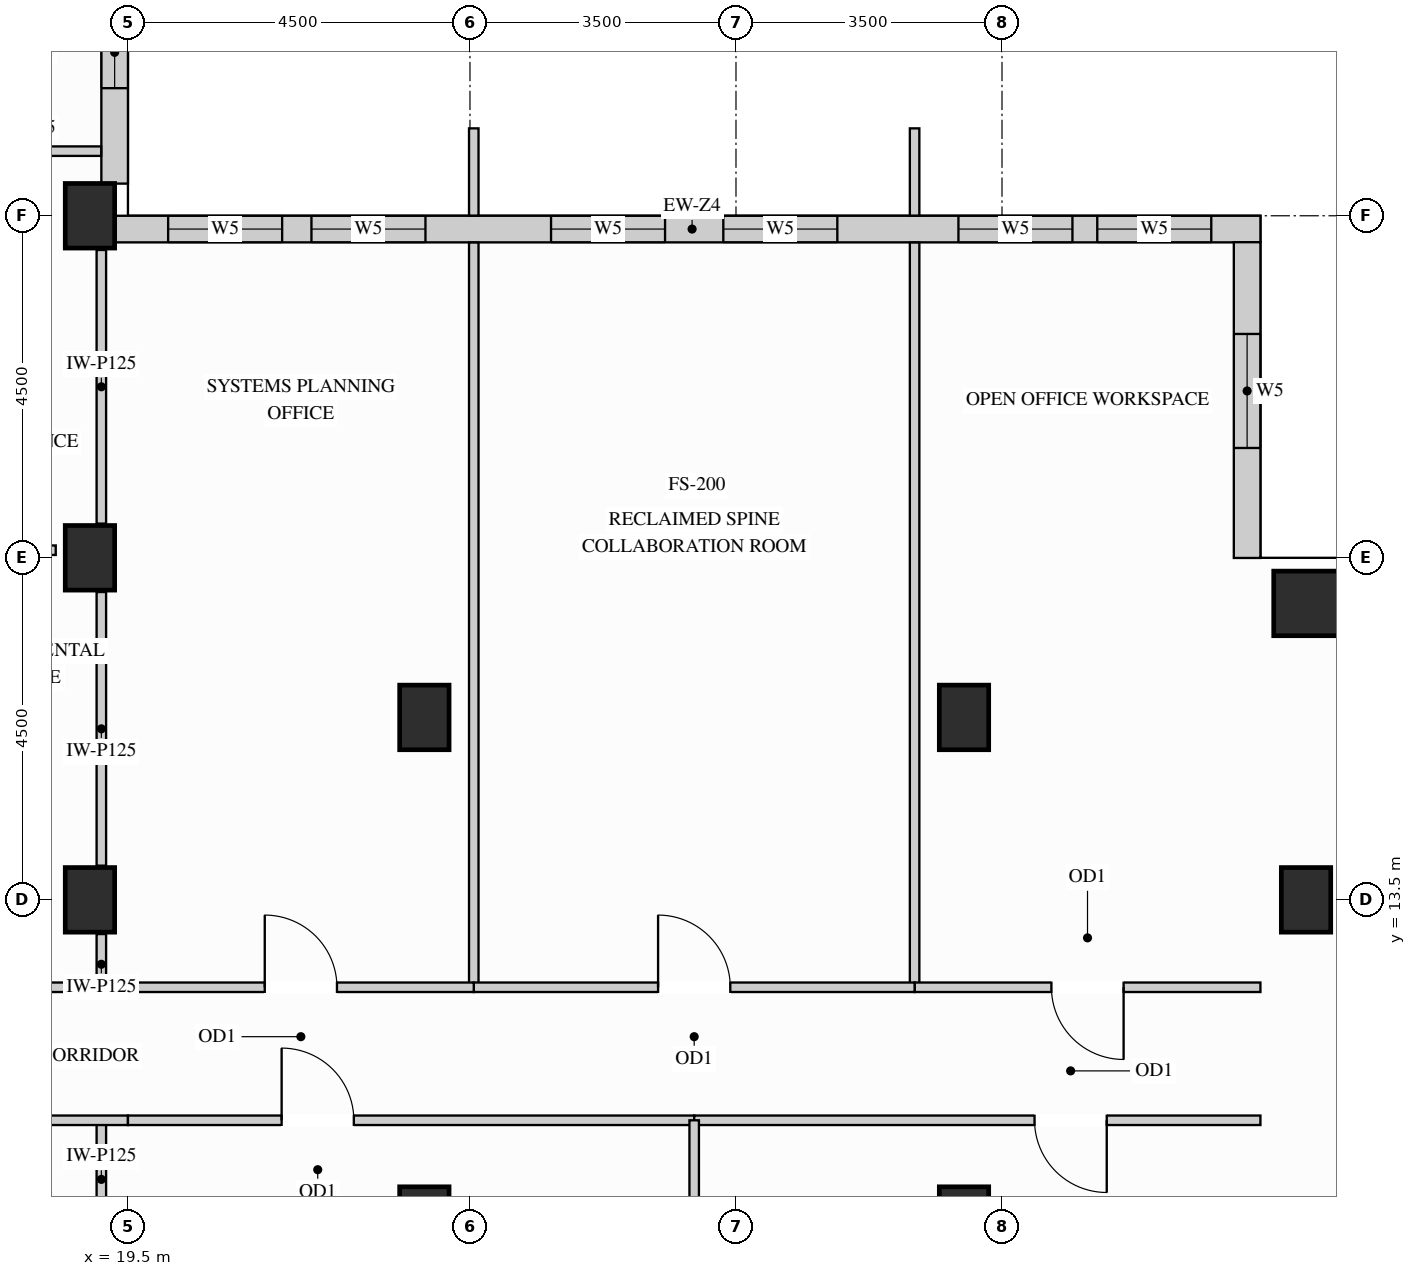
"""IFC4 building model, lengths in metres.
Left out: names, types, materials, properties, quantities, classifications, styles, units other than length and angle.
Written with IfcOpenShell. Run it as: python <this file> out.ifc"""

import sys

from ifc_helpers import new_model, si_unit, direction, frame, frame_2d, origin, origin_2d, place, context, subcontext, project, spatial, rectangle, extrude, source, transform, mapped, element, fill, save


model = new_model("IFC4")
c1 = context("Model", 3, precision=1e-05, world=origin(), true_north=direction((0.0, 1.0)))
c2 = subcontext(c1, "Body", "Model", "MODEL_VIEW")
j1 = project(units=[si_unit("LENGTHUNIT", "METRE"), si_unit("PLANEANGLEUNIT", "RADIAN")], contexts=[c1])
p1 = place(None, origin())
s1 = spatial("IfcSite", under=j1, at=p1, CompositionType="ELEMENT")
p2 = place(p1, origin())
s2 = spatial("IfcBuilding", under=s1, at=p2, CompositionType="ELEMENT")
p3 = place(p2, frame((0.0, 0.0, 259.2)))
s3 = spatial("IfcBuildingStorey", under=s2, at=p3, CompositionType="ELEMENT", Elevation=259.2)
m1 = source(origin(), c2, "Body", "SweptSolid", [
    extrude(rectangle(XDim=0.65, YDim=0.85, at=origin_2d()), origin(), (0.0, 0.0, 1.0), 3.4),
])
for number, where, z_axis, x_axis in (
    (1, (19.0, 13.5, 0.0), (0.0, 0.0, 1.0), (1.0, 0.0, 0.0)),
    (2, (19.0, 18.0, 0.0), (0.0, 0.0, 1.0), (1.0, 0.0, 0.0)),
    (3, (19.0, 22.5, 0.0), (0.0, 0.0, 1.0), (1.0, 0.0, 0.0)),
    (4, (35.0, 13.5, 0.0), (0.0, 0.0, 1.0), (1.0, 0.0, 0.0)),
    (5, (23.4, 15.9, 0.0), (0.0, 0.0, 1.0), (1.0, 0.0, 0.0)),
    (6, (23.4, 9.3, 0.0), (0.0, 0.0, 1.0), (1.0, 0.0, 0.0)),
    (7, (30.5, 15.9, 0.0), (0.0, 0.0, 1.0), (1.0, 0.0, 0.0)),
    (8, (30.5, 9.3, 0.0), (0.0, 0.0, 1.0), (1.0, 0.0, 0.0)),
):
    element("IfcColumn", number, at=place(p3, frame(where, z_axis=z_axis, x_axis=x_axis)), inside=s3, PredefinedType="COLUMN", context=c2, shape_type="MappedRepresentation", body=[
        mapped(m1, transform((0.0, 0.0, 0.0), x_axis=(1.0, 0.0, 0.0), y_axis=(0.0, 1.0, 0.0), z_axis=(0.0, 0.0, 1.0))),
    ])
m2 = source(origin(), c2, "Body", "SweptSolid", [
    extrude(rectangle(XDim=0.85, YDim=0.85, at=origin_2d()), origin(), (0.0, 0.0, 1.0), 3.4),
])
p4 = place(p3, frame((35.0, 17.4, 0.0), z_axis=(0.0, 0.0, 1.0), x_axis=(1.0, 0.0, 0.0)))
e9 = element("IfcColumn", 9, at=p4, inside=s3, PredefinedType="COLUMN", context=c2, shape_type="MappedRepresentation", body=[
    mapped(m2, transform((0.0, 0.0, 0.0), x_axis=(1.0, 0.0, 0.0), y_axis=(0.0, 1.0, 0.0), z_axis=(0.0, 0.0, 1.0))),
])
p5 = place(p3, frame((34.4, 22.325, 0.0), z_axis=(0.0, 0.0, 1.0), x_axis=(-1.0, 0.0, 0.0)))
e10 = element("IfcWall", 10, at=p5, inside=s3, PredefinedType="SOLIDWALL", context=c2, shape_type="SweptSolid", body=[
    extrude(rectangle(XDim=15.077, YDim=0.35, at=frame_2d((7.539, 0.0))), origin(), (0.0, 0.0, 1.0), 3.385),
])
p6 = place(p5, frame((0.647, 0.0, 0.78)))
e11 = element("IfcOpeningElement", 11, at=p6, cuts=e10, PredefinedType="OPENING", context=c2, shape_type="SweptSolid", body=[
    extrude(rectangle(XDim=1.5, YDim=2.0, at=frame_2d((0.75, 1.0))), frame((0.0, 0.185, 0.0), z_axis=(0.0, -1.0, 0.0), x_axis=(1.0, 0.0, 0.0)), (0.0, 0.0, 1.0), 0.37),
])
p7 = place(p5, frame((2.473, 0.0, 0.78)))
e12 = element("IfcOpeningElement", 12, at=p7, cuts=e10, PredefinedType="OPENING", context=c2, shape_type="SweptSolid", body=[
    extrude(rectangle(XDim=1.5, YDim=2.0, at=frame_2d((0.75, 1.0))), frame((0.0, 0.185, 0.0), z_axis=(0.0, -1.0, 0.0), x_axis=(1.0, 0.0, 0.0)), (0.0, 0.0, 1.0), 0.37),
])
p8 = place(p5, frame((5.567, 0.0, 0.78)))
e13 = element("IfcOpeningElement", 13, at=p8, cuts=e10, PredefinedType="OPENING", context=c2, shape_type="SweptSolid", body=[
    extrude(rectangle(XDim=1.5, YDim=2.0, at=frame_2d((0.75, 1.0))), frame((0.0, 0.185, 0.0), z_axis=(0.0, -1.0, 0.0), x_axis=(1.0, 0.0, 0.0)), (0.0, 0.0, 1.0), 0.37),
])
p9 = place(p5, frame((7.833, 0.0, 0.78)))
e14 = element("IfcOpeningElement", 14, at=p9, cuts=e10, PredefinedType="OPENING", context=c2, shape_type="SweptSolid", body=[
    extrude(rectangle(XDim=1.5, YDim=2.0, at=frame_2d((0.75, 1.0))), frame((0.0, 0.185, 0.0), z_axis=(0.0, -1.0, 0.0), x_axis=(1.0, 0.0, 0.0)), (0.0, 0.0, 1.0), 0.37),
])
p10 = place(p5, frame((10.986, 0.0, 0.78)))
e15 = element("IfcOpeningElement", 15, at=p10, cuts=e10, PredefinedType="OPENING", context=c2, shape_type="SweptSolid", body=[
    extrude(rectangle(XDim=1.5, YDim=2.0, at=frame_2d((0.75, 1.0))), frame((0.0, 0.185, 0.0), z_axis=(0.0, -1.0, 0.0), x_axis=(1.0, 0.0, 0.0)), (0.0, 0.0, 1.0), 0.37),
])
p11 = place(p5, frame((12.871, 0.0, 0.78)))
e16 = element("IfcOpeningElement", 16, at=p11, cuts=e10, PredefinedType="OPENING", context=c2, shape_type="SweptSolid", body=[
    extrude(rectangle(XDim=1.5, YDim=2.0, at=frame_2d((0.75, 1.0))), frame((0.0, 0.185, 0.0), z_axis=(0.0, -1.0, 0.0), x_axis=(1.0, 0.0, 0.0)), (0.0, 0.0, 1.0), 0.37),
])
p12 = place(p3, frame((19.325, 22.923, 0.0), z_axis=(0.0, 0.0, 1.0), x_axis=(0.0, 1.0, 0.0)))
e17 = element("IfcWall", 17, at=p12, inside=s3, PredefinedType="SOLIDWALL", context=c2, shape_type="SweptSolid", body=[
    extrude(rectangle(XDim=3.454, YDim=0.35, at=frame_2d((1.727, 0.0))), origin(), (0.0, 0.0, 1.0), 2.619),
])
p13 = place(p12, frame((1.256, 0.0, 0.78)))
e18 = element("IfcOpeningElement", 18, at=p13, cuts=e17, PredefinedType="OPENING", context=c2, shape_type="SweptSolid", body=[
    extrude(rectangle(XDim=1.5, YDim=1.659, at=frame_2d((0.75, 0.83))), frame((0.0, 0.185, 0.0), z_axis=(0.0, -1.0, 0.0), x_axis=(1.0, 0.0, 0.0)), (0.0, 0.0, 1.0), 0.37),
])
p14 = place(p3, frame((34.225, 17.998, 0.0), z_axis=(0.0, 0.0, 1.0), x_axis=(0.0, 1.0, 0.0)))
e19 = element("IfcWall", 19, at=p14, inside=s3, PredefinedType="SOLIDWALL", context=c2, shape_type="SweptSolid", body=[
    extrude(rectangle(XDim=4.154, YDim=0.35, at=frame_2d((2.077, 0.0))), origin(), (0.0, 0.0, 1.0), 3.385),
])
p15 = place(p14, frame((1.447, 0.0, 0.78)))
e20 = element("IfcOpeningElement", 20, at=p15, cuts=e19, PredefinedType="OPENING", context=c2, shape_type="SweptSolid", body=[
    extrude(rectangle(XDim=1.5, YDim=2.0, at=frame_2d((0.75, 1.0))), frame((0.0, 0.185, 0.0), z_axis=(0.0, -1.0, 0.0), x_axis=(1.0, 0.0, 0.0)), (0.0, 0.0, 1.0), 0.37),
])
m3 = source(origin(), c2, "Body", "SweptSolid", [
    extrude(rectangle(XDim=1.5, YDim=0.125, at=frame_2d((0.75, 0.0))), origin(), (0.0, 0.0, 1.0), 2.773),
])
p16 = place(p3, frame((17.05, 18.1, 0.0), z_axis=(0.0, 0.0, 1.0), x_axis=(1.0, 0.0, 0.0)))
e21 = element("IfcWall", 21, at=p16, inside=s3, PredefinedType="PARTITIONING", context=c2, shape_type="MappedRepresentation", body=[
    mapped(m3, transform((0.0, 0.0, 0.0), x_axis=(1.0, 0.0, 0.0), y_axis=(0.0, 1.0, 0.0), z_axis=(0.0, 0.0, 1.0))),
])
m4 = source(origin(), c2, "Body", "SweptSolid", [
    extrude(rectangle(XDim=2.098, YDim=0.125, at=frame_2d((1.049, 0.0))), origin(), (0.0, 0.0, 1.0), 3.385),
])
p17 = place(p3, frame((17.05, 23.35, 0.0), z_axis=(0.0, 0.0, 1.0), x_axis=(1.0, 0.0, 0.0)))
e22 = element("IfcWall", 22, at=p17, inside=s3, PredefinedType="PARTITIONING", context=c2, shape_type="MappedRepresentation", body=[
    mapped(m4, transform((0.0, 0.0, 0.0), x_axis=(1.0, 0.0, 0.0), y_axis=(0.0, 1.0, 0.0), z_axis=(0.0, 0.0, 1.0))),
])
m5 = source(origin(), c2, "Body", "SweptSolid", [
    extrude(rectangle(XDim=0.7, YDim=0.125, at=frame_2d((0.35, 0.0))), origin(), (0.0, 0.0, 1.0), 2.773),
])
p18 = place(p3, frame((19.15, 12.35, 0.0), z_axis=(0.0, 0.0, 1.0), x_axis=(0.0, 1.0, 0.0)))
e23 = element("IfcWall", 23, at=p18, inside=s3, PredefinedType="PARTITIONING", context=c2, shape_type="MappedRepresentation", body=[
    mapped(m5, transform((0.0, 0.0, 0.0), x_axis=(1.0, 0.0, 0.0), y_axis=(0.0, 1.0, 0.0), z_axis=(0.0, 0.0, 1.0))),
])
m6 = source(origin(), c2, "Body", "SweptSolid", [
    extrude(rectangle(XDim=3.6, YDim=0.125, at=frame_2d((1.8, 0.0))), origin(), (0.0, 0.0, 1.0), 2.773),
])
for number, where, z_axis, x_axis in (
    (24, (19.15, 13.95, 0.0), (0.0, 0.0, 1.0), (0.0, 1.0, 0.0)),
    (25, (19.15, 18.45, 0.0), (0.0, 0.0, 1.0), (0.0, 1.0, 0.0)),
):
    element("IfcWall", number, at=place(p3, frame(where, z_axis=z_axis, x_axis=x_axis)), inside=s3, PredefinedType="PARTITIONING", context=c2, shape_type="MappedRepresentation", body=[
        mapped(m6, transform((0.0, 0.0, 0.0), x_axis=(1.0, 0.0, 0.0), y_axis=(0.0, 1.0, 0.0), z_axis=(0.0, 0.0, 1.0))),
    ])
m7 = source(origin(), c2, "Body", "SweptSolid", [
    extrude(rectangle(XDim=1.65, YDim=0.125, at=frame_2d((0.825, 0.0))), origin(), (0.0, 0.0, 1.0), 2.773),
])
p19 = place(p3, frame((19.15, 8.95, 0.0), z_axis=(0.0, 0.0, 1.0), x_axis=(0.0, 1.0, 0.0)))
e26 = element("IfcWall", 26, at=p19, inside=s3, PredefinedType="PARTITIONING", context=c2, shape_type="MappedRepresentation", body=[
    mapped(m7, transform((0.0, 0.0, 0.0), x_axis=(1.0, 0.0, 0.0), y_axis=(0.0, 1.0, 0.0), z_axis=(0.0, 0.0, 1.0))),
])
m8 = source(origin(), c2, "Body", "SweptSolid", [
    extrude(rectangle(XDim=9.798, YDim=0.125, at=frame_2d((4.899, 0.0))), origin(), (0.0, 0.0, 1.0), 3.385),
])
p20 = place(p3, frame((24.05, 12.35, 0.0), z_axis=(0.0, 0.0, 1.0), x_axis=(0.0, 1.0, 0.0)))
e27 = element("IfcWall", 27, at=p20, inside=s3, PredefinedType="PARTITIONING", context=c2, shape_type="MappedRepresentation", body=[
    mapped(m8, transform((0.0, 0.0, 0.0), x_axis=(1.0, 0.0, 0.0), y_axis=(0.0, 1.0, 0.0), z_axis=(0.0, 0.0, 1.0))),
])
m9 = source(origin(), c2, "Body", "SweptSolid", [
    extrude(rectangle(XDim=1.148, YDim=0.125, at=frame_2d((0.574, 0.0))), origin(), (0.0, 0.0, 1.0), 3.385),
])
p21 = place(p3, frame((24.05, 22.502, 0.0), z_axis=(0.0, 0.0, 1.0), x_axis=(0.0, 1.0, 0.0)))
e28 = element("IfcWall", 28, at=p21, inside=s3, PredefinedType="PARTITIONING", context=c2, shape_type="MappedRepresentation", body=[
    mapped(m9, transform((0.0, 0.0, 0.0), x_axis=(1.0, 0.0, 0.0), y_axis=(0.0, 1.0, 0.0), z_axis=(0.0, 0.0, 1.0))),
])
p22 = place(p3, frame((29.85, 12.35, 0.0), z_axis=(0.0, 0.0, 1.0), x_axis=(0.0, 1.0, 0.0)))
e29 = element("IfcWall", 29, at=p22, inside=s3, PredefinedType="PARTITIONING", context=c2, shape_type="MappedRepresentation", body=[
    mapped(m8, transform((0.0, 0.0, 0.0), x_axis=(1.0, 0.0, 0.0), y_axis=(0.0, 1.0, 0.0), z_axis=(0.0, 0.0, 1.0))),
])
p23 = place(p3, frame((29.85, 22.502, 0.0), z_axis=(0.0, 0.0, 1.0), x_axis=(0.0, 1.0, 0.0)))
e30 = element("IfcWall", 30, at=p23, inside=s3, PredefinedType="PARTITIONING", context=c2, shape_type="MappedRepresentation", body=[
    mapped(m9, transform((0.0, 0.0, 0.0), x_axis=(1.0, 0.0, 0.0), y_axis=(0.0, 1.0, 0.0), z_axis=(0.0, 0.0, 1.0))),
])
p24 = place(p3, frame((29.85, 12.35, 0.0), z_axis=(0.0, 0.0, 1.0), x_axis=(1.0, 0.0, 0.0)))
e31 = element("IfcWall", 31, at=p24, inside=s3, PredefinedType="PARTITIONING", context=c2, shape_type="SweptSolid", body=[
    extrude(rectangle(XDim=4.55, YDim=0.125, at=frame_2d((2.275, 0.0))), origin(), (0.0, 0.0, 1.0), 3.385),
])
p25 = place(p24, frame((1.8, 0.0, 0.0)))
e32 = element("IfcOpeningElement", 32, at=p25, cuts=e31, PredefinedType="OPENING", context=c2, shape_type="SweptSolid", body=[
    extrude(rectangle(XDim=0.95, YDim=2.15, at=frame_2d((0.475, 1.075))), frame((0.0, 0.073, 0.0), z_axis=(0.0, -1.0, 0.0), x_axis=(1.0, 0.0, 0.0)), (0.0, 0.0, 1.0), 0.145),
])
p26 = place(p3, frame((24.05, 12.35, 0.0), z_axis=(0.0, 0.0, 1.0), x_axis=(1.0, 0.0, 0.0)))
e33 = element("IfcWall", 33, at=p26, inside=s3, PredefinedType="PARTITIONING", context=c2, shape_type="SweptSolid", body=[
    extrude(rectangle(XDim=5.8, YDim=0.125, at=frame_2d((2.9, 0.0))), origin(), (0.0, 0.0, 1.0), 3.385),
])
p27 = place(p26, frame((2.425, 0.0, 0.0)))
e34 = element("IfcOpeningElement", 34, at=p27, cuts=e33, PredefinedType="OPENING", context=c2, shape_type="SweptSolid", body=[
    extrude(rectangle(XDim=0.95, YDim=2.15, at=frame_2d((0.475, 1.075))), frame((0.0, 0.073, 0.0), z_axis=(0.0, -1.0, 0.0), x_axis=(1.0, 0.0, 0.0)), (0.0, 0.0, 1.0), 0.145),
])
m10 = source(origin(), c2, "Body", "SweptSolid", [
    extrude(rectangle(XDim=2.45, YDim=0.125, at=frame_2d((1.225, 0.0))), origin(), (0.0, 0.0, 1.0), 3.385),
])
p28 = place(p3, frame((17.05, 12.35, 0.0), z_axis=(0.0, 0.0, 1.0), x_axis=(1.0, 0.0, 0.0)))
e35 = element("IfcWall", 35, at=p28, inside=s3, PredefinedType="PARTITIONING", context=c2, shape_type="MappedRepresentation", body=[
    mapped(m10, transform((0.0, 0.0, 0.0), x_axis=(1.0, 0.0, 0.0), y_axis=(0.0, 1.0, 0.0), z_axis=(0.0, 0.0, 1.0))),
])
p29 = place(p3, frame((19.5, 12.35, 0.0), z_axis=(0.0, 0.0, 1.0), x_axis=(1.0, 0.0, 0.0)))
e36 = element("IfcWall", 36, at=p29, inside=s3, PredefinedType="PARTITIONING", context=c2, shape_type="SweptSolid", body=[
    extrude(rectangle(XDim=4.55, YDim=0.125, at=frame_2d((2.275, 0.0))), origin(), (0.0, 0.0, 1.0), 3.385),
])
p30 = place(p29, frame((1.8, 0.0, 0.0)))
e37 = element("IfcOpeningElement", 37, at=p30, cuts=e36, PredefinedType="OPENING", context=c2, shape_type="SweptSolid", body=[
    extrude(rectangle(XDim=0.95, YDim=2.15, at=frame_2d((0.475, 1.075))), frame((0.0, 0.073, 0.0), z_axis=(0.0, -1.0, 0.0), x_axis=(1.0, 0.0, 0.0)), (0.0, 0.0, 1.0), 0.145),
])
p31 = place(p3, frame((17.05, 10.6, 0.0), z_axis=(0.0, 0.0, 1.0), x_axis=(1.0, 0.0, 0.0)))
e38 = element("IfcWall", 38, at=p31, inside=s3, PredefinedType="PARTITIONING", context=c2, shape_type="MappedRepresentation", body=[
    mapped(m10, transform((0.0, 0.0, 0.0), x_axis=(1.0, 0.0, 0.0), y_axis=(0.0, 1.0, 0.0), z_axis=(0.0, 0.0, 1.0))),
])
p32 = place(p3, frame((19.5, 10.6, 0.0), z_axis=(0.0, 0.0, 1.0), x_axis=(1.0, 0.0, 0.0)))
e39 = element("IfcWall", 39, at=p32, inside=s3, PredefinedType="PARTITIONING", context=c2, shape_type="SweptSolid", body=[
    extrude(rectangle(XDim=7.45, YDim=0.125, at=frame_2d((3.725, 0.0))), origin(), (0.0, 0.0, 1.0), 3.385),
])
p33 = place(p32, frame((2.022, 0.0, 0.0)))
e40 = element("IfcOpeningElement", 40, at=p33, cuts=e39, PredefinedType="OPENING", context=c2, shape_type="SweptSolid", body=[
    extrude(rectangle(XDim=0.95, YDim=2.15, at=frame_2d((0.475, 1.075))), frame((0.0, 0.073, 0.0), z_axis=(0.0, -1.0, 0.0), x_axis=(1.0, 0.0, 0.0)), (0.0, 0.0, 1.0), 0.145),
])
p34 = place(p3, frame((26.95, 10.6, 0.0), z_axis=(0.0, 0.0, 1.0), x_axis=(1.0, 0.0, 0.0)))
e41 = element("IfcWall", 41, at=p34, inside=s3, PredefinedType="PARTITIONING", context=c2, shape_type="SweptSolid", body=[
    extrude(rectangle(XDim=7.45, YDim=0.125, at=frame_2d((3.725, 0.0))), origin(), (0.0, 0.0, 1.0), 3.385),
])
p35 = place(p34, frame((4.478, 0.0, 0.0)))
e42 = element("IfcOpeningElement", 42, at=p35, cuts=e41, PredefinedType="OPENING", context=c2, shape_type="SweptSolid", body=[
    extrude(rectangle(XDim=0.95, YDim=2.15, at=frame_2d((0.475, 1.075))), frame((0.0, 0.073, 0.0), z_axis=(0.0, -1.0, 0.0), x_axis=(1.0, 0.0, 0.0)), (0.0, 0.0, 1.0), 0.145),
])
m11 = source(origin(), c2, "Body", "SweptSolid", [
    extrude(rectangle(XDim=10.25, YDim=0.125, at=frame_2d((5.125, 0.0))), origin(), (0.0, 0.0, 1.0), 3.385),
])
p36 = place(p3, frame((26.95, 0.35, 0.0), z_axis=(0.0, 0.0, 1.0), x_axis=(0.0, 1.0, 0.0)))
e43 = element("IfcWall", 43, at=p36, inside=s3, PredefinedType="PARTITIONING", context=c2, shape_type="MappedRepresentation", body=[
    mapped(m11, transform((0.0, 0.0, 0.0), x_axis=(1.0, 0.0, 0.0), y_axis=(0.0, 1.0, 0.0), z_axis=(0.0, 0.0, 1.0))),
])
m12 = source(origin(), c2, "Body", "SweptSolid", [
    extrude(rectangle(XDim=0.95, YDim=2.15, at=frame_2d((0.475, 1.075))), frame((0.0, 0.025, 0.0), z_axis=(0.0, -1.0, 0.0), x_axis=(1.0, 0.0, 0.0)), (0.0, 0.0, 1.0), 0.05),
])
p37 = place(p27, origin())
e44 = element("IfcDoor", 44, at=p37, inside=s3, OperationType="SINGLE_SWING_LEFT", PredefinedType="DOOR", context=c2, shape_type="MappedRepresentation", body=[
    mapped(m12, transform((0.0, 0.0, 0.0), x_axis=(1.0, 0.0, 0.0), y_axis=(0.0, 1.0, 0.0), z_axis=(0.0, 0.0, 1.0))),
])
fill(e34, e44)
p38 = place(p30, origin())
e45 = element("IfcDoor", 45, at=p38, inside=s3, OperationType="SINGLE_SWING_LEFT", PredefinedType="DOOR", context=c2, shape_type="MappedRepresentation", body=[
    mapped(m12, transform((0.0, 0.0, 0.0), x_axis=(1.0, 0.0, 0.0), y_axis=(0.0, 1.0, 0.0), z_axis=(0.0, 0.0, 1.0))),
])
fill(e37, e45)
p39 = place(p25, origin())
e46 = element("IfcDoor", 46, at=p39, inside=s3, OperationType="SINGLE_SWING_RIGHT", PredefinedType="DOOR", context=c2, shape_type="MappedRepresentation", body=[
    mapped(m12, transform((0.0, 0.0, 0.0), x_axis=(1.0, 0.0, 0.0), y_axis=(0.0, 1.0, 0.0), z_axis=(0.0, 0.0, 1.0))),
])
fill(e32, e46)
p40 = place(p33, origin())
e47 = element("IfcDoor", 47, at=p40, inside=s3, OperationType="SINGLE_SWING_LEFT", PredefinedType="DOOR", context=c2, shape_type="MappedRepresentation", body=[
    mapped(m12, transform((0.0, 0.0, 0.0), x_axis=(1.0, 0.0, 0.0), y_axis=(0.0, 1.0, 0.0), z_axis=(0.0, 0.0, 1.0))),
])
fill(e40, e47)
p41 = place(p35, origin())
e48 = element("IfcDoor", 48, at=p41, inside=s3, OperationType="SINGLE_SWING_RIGHT", PredefinedType="DOOR", context=c2, shape_type="MappedRepresentation", body=[
    mapped(m12, transform((0.0, 0.0, 0.0), x_axis=(1.0, 0.0, 0.0), y_axis=(0.0, 1.0, 0.0), z_axis=(0.0, 0.0, 1.0))),
])
fill(e42, e48)
m13 = source(origin(), c2, "Body", "SweptSolid", [
    extrude(rectangle(XDim=1.5, YDim=2.0, at=frame_2d((0.75, 1.0))), frame((0.0, 0.03, 0.0), z_axis=(0.0, -1.0, 0.0), x_axis=(1.0, 0.0, 0.0)), (0.0, 0.0, 1.0), 0.06),
])
p42 = place(p6, origin())
e49 = element("IfcWindow", 49, at=p42, inside=s3, PartitioningType="SINGLE_PANEL", PredefinedType="WINDOW", context=c2, shape_type="MappedRepresentation", body=[
    mapped(m13, transform((0.0, 0.0, 0.0), x_axis=(1.0, 0.0, 0.0), y_axis=(0.0, 1.0, 0.0), z_axis=(0.0, 0.0, 1.0))),
])
fill(e11, e49)
p43 = place(p7, origin())
e50 = element("IfcWindow", 50, at=p43, inside=s3, PartitioningType="SINGLE_PANEL", PredefinedType="WINDOW", context=c2, shape_type="MappedRepresentation", body=[
    mapped(m13, transform((0.0, 0.0, 0.0), x_axis=(1.0, 0.0, 0.0), y_axis=(0.0, 1.0, 0.0), z_axis=(0.0, 0.0, 1.0))),
])
fill(e12, e50)
p44 = place(p8, origin())
e51 = element("IfcWindow", 51, at=p44, inside=s3, PartitioningType="SINGLE_PANEL", PredefinedType="WINDOW", context=c2, shape_type="MappedRepresentation", body=[
    mapped(m13, transform((0.0, 0.0, 0.0), x_axis=(1.0, 0.0, 0.0), y_axis=(0.0, 1.0, 0.0), z_axis=(0.0, 0.0, 1.0))),
])
fill(e13, e51)
p45 = place(p9, origin())
e52 = element("IfcWindow", 52, at=p45, inside=s3, PartitioningType="SINGLE_PANEL", PredefinedType="WINDOW", context=c2, shape_type="MappedRepresentation", body=[
    mapped(m13, transform((0.0, 0.0, 0.0), x_axis=(1.0, 0.0, 0.0), y_axis=(0.0, 1.0, 0.0), z_axis=(0.0, 0.0, 1.0))),
])
fill(e14, e52)
p46 = place(p10, origin())
e53 = element("IfcWindow", 53, at=p46, inside=s3, PartitioningType="SINGLE_PANEL", PredefinedType="WINDOW", context=c2, shape_type="MappedRepresentation", body=[
    mapped(m13, transform((0.0, 0.0, 0.0), x_axis=(1.0, 0.0, 0.0), y_axis=(0.0, 1.0, 0.0), z_axis=(0.0, 0.0, 1.0))),
])
fill(e15, e53)
p47 = place(p11, origin())
e54 = element("IfcWindow", 54, at=p47, inside=s3, PartitioningType="SINGLE_PANEL", PredefinedType="WINDOW", context=c2, shape_type="MappedRepresentation", body=[
    mapped(m13, transform((0.0, 0.0, 0.0), x_axis=(1.0, 0.0, 0.0), y_axis=(0.0, 1.0, 0.0), z_axis=(0.0, 0.0, 1.0))),
])
fill(e16, e54)
m14 = source(origin(), c2, "Body", "SweptSolid", [
    extrude(rectangle(XDim=1.5, YDim=1.659, at=frame_2d((0.75, 0.83))), frame((0.0, 0.03, 0.0), z_axis=(0.0, -1.0, 0.0), x_axis=(1.0, 0.0, 0.0)), (0.0, 0.0, 1.0), 0.06),
])
p48 = place(p13, origin())
e55 = element("IfcWindow", 55, at=p48, inside=s3, PartitioningType="SINGLE_PANEL", PredefinedType="WINDOW", context=c2, shape_type="MappedRepresentation", body=[
    mapped(m14, transform((0.0, 0.0, 0.0), x_axis=(1.0, 0.0, 0.0), y_axis=(0.0, 1.0, 0.0), z_axis=(0.0, 0.0, 1.0))),
])
fill(e18, e55)
p49 = place(p15, origin())
e56 = element("IfcWindow", 56, at=p49, inside=s3, PartitioningType="SINGLE_PANEL", PredefinedType="WINDOW", context=c2, shape_type="MappedRepresentation", body=[
    mapped(m13, transform((0.0, 0.0, 0.0), x_axis=(1.0, 0.0, 0.0), y_axis=(0.0, 1.0, 0.0), z_axis=(0.0, 0.0, 1.0))),
])
fill(e20, e56)
save(model, sys.argv[1])
